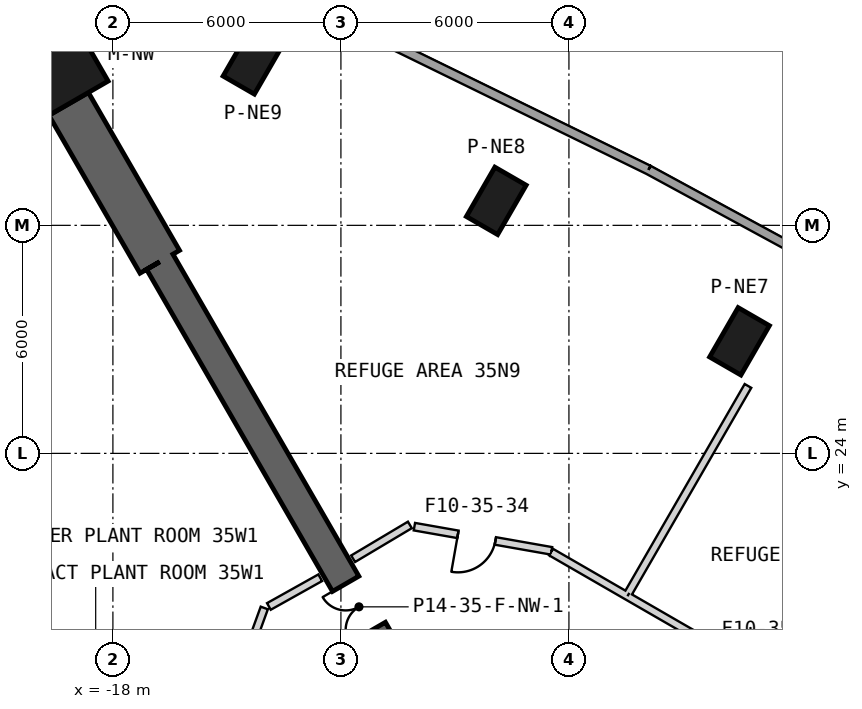
"""IFC4 building model, lengths in metres.
Left out: names, types, materials, properties, quantities, classifications, styles, units other than length and angle.
Written with IfcOpenShell. Run it as: python <this file> out.ifc"""

import sys

from ifc_helpers import new_model, si_unit, direction, frame, frame_2d, origin, origin_2d, place, context, subcontext, project, spatial, rectangle, extrude, element, fill, save


model = new_model("IFC4")
c1 = context("Model", 3, precision=1e-05, world=origin(), true_north=direction((0.0, 1.0)))
c2 = subcontext(c1, "Body", "Model", "MODEL_VIEW")
j1 = project(units=[si_unit("LENGTHUNIT", "METRE"), si_unit("PLANEANGLEUNIT", "RADIAN")], contexts=[c1])
p1 = place(None, origin())
s1 = spatial("IfcSite", under=j1, at=p1, CompositionType="ELEMENT")
p2 = place(p1, origin())
s2 = spatial("IfcBuilding", under=s1, at=p2, CompositionType="ELEMENT")
p3 = place(p2, frame((0.0, 0.0, 163.2)))
s3 = spatial("IfcBuildingStorey", under=s2, at=p3, CompositionType="ELEMENT", Elevation=163.2)
p4 = place(p3, frame((-19.915, 34.494, 0.0), z_axis=(0.0, 0.0, 1.0), x_axis=(-0.5, 0.866025403784, 0.0)))
e1 = element("IfcColumn", 1, at=p4, inside=s3, PredefinedType="COLUMN", context=c2, shape_type="SweptSolid", body=[
    extrude(rectangle(XDim=3.0, YDim=2.4, at=origin_2d()), origin(), (0.0, 0.0, 1.0), 5.7),
])
for number, where, z_axis, x_axis in (
    (2, (-1.511, 26.948, 0.0), (0.0, 0.0, 1.0), (0.5, 0.866, 0.0)),
    (3, (-7.912, 30.644, 0.0), (0.0, 0.0, 1.0), (0.5, 0.866, 0.0)),
    (4, (-14.313, 34.34, 0.0), (0.0, 0.0, 1.0), (0.5, 0.866, 0.0)),
):
    element("IfcColumn", number, at=place(p3, frame(where, z_axis=z_axis, x_axis=x_axis)), inside=s3, PredefinedType="COLUMN", context=c2, shape_type="SweptSolid", body=[
        extrude(rectangle(XDim=1.5, YDim=0.95, at=origin_2d()), origin(), (0.0, 0.0, 1.0), 5.7),
    ])
p5 = place(p3, frame((-10.575, 18.316, 0.0), z_axis=(0.0, 0.0, 1.0), x_axis=(-0.500002326941, 0.86602406032, 0.0)))
e5 = element("IfcWall", 5, at=p5, inside=s3, PredefinedType="SHEAR", context=c2, shape_type="SweptSolid", body=[
    extrude(rectangle(XDim=12.384, YDim=0.8, at=frame_2d((6.192, 0.0))), origin(), (0.0, 0.0, 1.0), 6.0),
])
p6 = place(p5, frame((1.2, 0.0, 0.0)))
e6 = element("IfcOpeningElement", 6, at=p6, cuts=e5, PredefinedType="OPENING", context=c2, shape_type="SweptSolid", body=[
    extrude(rectangle(XDim=1.4, YDim=2.4, at=frame_2d((0.7, 1.2))), frame((0.0, 0.41, 0.0), z_axis=(0.0, -1.0, 0.0), x_axis=(1.0, 0.0, 0.0)), (0.0, 0.0, 1.0), 0.82),
])
p7 = place(p3, frame((-16.767, 29.041, -0.35), z_axis=(0.0, 0.0, 1.0), x_axis=(-0.499998569178, 0.866026229868, 0.0)))
e7 = element("IfcWall", 7, at=p7, inside=s3, PredefinedType="SHEAR", context=c2, shape_type="SweptSolid", body=[
    extrude(rectangle(XDim=4.796, YDim=1.2, at=frame_2d((2.398, 0.0))), origin(), (0.0, 0.0, 1.0), 6.35),
])
p8 = place(p3, frame((29.693, 13.206, 0.0), z_axis=(0.0, 0.0, 1.0), x_axis=(-0.878694903116, 0.477383773539, 0.0)))
e8 = element("IfcWall", 8, at=p8, inside=s3, PredefinedType="SOLIDWALL", context=c2, shape_type="SweptSolid", body=[
    extrude(rectangle(XDim=38.239, YDim=0.24, at=frame_2d((19.12, 0.0))), origin(), (0.0, 0.0, 1.0), 5.7),
])
p9 = place(p3, frame((-3.907, 31.46, 0.0), z_axis=(0.0, 0.0, 1.0), x_axis=(-0.898378322221, 0.439222483672, 0.0)))
e9 = element("IfcWall", 9, at=p9, inside=s3, PredefinedType="SOLIDWALL", context=c2, shape_type="SweptSolid", body=[
    extrude(rectangle(XDim=12.762, YDim=0.24, at=frame_2d((6.381, 0.0))), origin(), (0.0, 0.0, 1.0), 5.7),
])
p10 = place(p3, frame((-14.016, 19.932, 0.0), z_axis=(0.0, 0.0, 1.0), x_axis=(-0.342040663333, -0.93968515186, 0.0)))
e10 = element("IfcWall", 10, at=p10, inside=s3, PredefinedType="PARTITIONING", context=c2, shape_type="SweptSolid", body=[
    extrude(rectangle(XDim=3.096, YDim=0.2, at=frame_2d((1.548, 0.0))), origin(), (0.0, 0.0, 1.0), 4.78),
])
p11 = place(p10, frame((1.037, 0.0, 0.0)))
e11 = element("IfcOpeningElement", 11, at=p11, cuts=e10, PredefinedType="OPENING", context=c2, shape_type="SweptSolid", body=[
    extrude(rectangle(XDim=1.0, YDim=2.1, at=frame_2d((0.5, 1.05))), frame((0.0, 0.11, 0.0), z_axis=(0.0, -1.0, 0.0), x_axis=(1.0, 0.0, 0.0)), (0.0, 0.0, 1.0), 0.22),
])
p12 = place(p3, frame((-12.544, 20.728, 0.0), z_axis=(0.0, 0.0, 1.0), x_axis=(-0.872739922591, -0.488185443777, 0.0)))
e12 = element("IfcWall", 12, at=p12, inside=s3, PredefinedType="PARTITIONING", context=c2, shape_type="SweptSolid", body=[
    extrude(rectangle(XDim=1.548, YDim=0.2, at=frame_2d((0.774, 0.0))), origin(), (0.0, 0.0, 1.0), 5.7),
])
p13 = place(p3, frame((1.617, 16.733, 0.0), z_axis=(0.0, 0.0, 1.0), x_axis=(-0.866020444499, 0.500008589636, 0.0)))
e13 = element("IfcWall", 13, at=p13, inside=s3, PredefinedType="PARTITIONING", context=c2, shape_type="SweptSolid", body=[
    extrude(rectangle(XDim=7.017, YDim=0.2, at=frame_2d((3.508, 0.0))), origin(), (0.0, 0.0, 1.0), 4.98),
])
p14 = place(p13, frame((3.05, 0.0, 0.0)))
e14 = element("IfcOpeningElement", 14, at=p14, cuts=e13, PredefinedType="OPENING", context=c2, shape_type="SweptSolid", body=[
    extrude(rectangle(XDim=1.0, YDim=2.1, at=frame_2d((0.5, 1.05))), frame((0.0, 0.11, 0.0), z_axis=(0.0, -1.0, 0.0), x_axis=(1.0, 0.0, 0.0)), (0.0, 0.0, 1.0), 0.22),
])
p15 = place(p3, frame((-4.46, 20.242, 0.0), z_axis=(0.0, 0.0, 1.0), x_axis=(-0.866008748622, 0.500028846479, 0.0)))
e15 = element("IfcWall", 15, at=p15, inside=s3, PredefinedType="PARTITIONING", context=c2, shape_type="SweptSolid", body=[
    extrude(rectangle(XDim=2.322, YDim=0.2, at=frame_2d((1.161, 0.0))), origin(), (0.0, 0.0, 1.0), 4.88),
])
p16 = place(p3, frame((-10.185, 22.117, 0.0), z_axis=(0.0, 0.0, 1.0), x_axis=(-0.859137024003, -0.511745614526, 0.0)))
e16 = element("IfcWall", 16, at=p16, inside=s3, PredefinedType="PARTITIONING", context=c2, shape_type="SweptSolid", body=[
    extrude(rectangle(XDim=1.738, YDim=0.2, at=frame_2d((0.869, 0.0))), origin(), (0.0, 0.0, 1.0), 5.7),
])
p17 = place(p3, frame((-6.459, 21.436, 0.0), z_axis=(0.0, 0.0, 1.0), x_axis=(-0.984812396858, 0.173621839051, 0.0)))
e17 = element("IfcWall", 17, at=p17, inside=s3, PredefinedType="PARTITIONING", context=c2, shape_type="SweptSolid", body=[
    extrude(rectangle(XDim=3.663, YDim=0.2, at=frame_2d((1.832, 0.0))), origin(), (0.0, 0.0, 1.0), 4.78),
])
p18 = place(p17, frame((1.5, 0.0, 0.0)))
e18 = element("IfcOpeningElement", 18, at=p18, cuts=e17, PredefinedType="OPENING", context=c2, shape_type="SweptSolid", body=[
    extrude(rectangle(XDim=1.0, YDim=2.1, at=frame_2d((0.5, 1.05))), frame((0.0, 0.11, 0.0), z_axis=(0.0, -1.0, 0.0), x_axis=(1.0, 0.0, 0.0)), (0.0, 0.0, 1.0), 0.22),
])
p19 = place(p3, frame((-4.427, 20.338, 0.0), z_axis=(0.0, 0.0, 1.0), x_axis=(0.500016456633, 0.866015902334, 0.0)))
e19 = element("IfcWall", 19, at=p19, inside=s3, PredefinedType="PARTITIONING", context=c2, shape_type="SweptSolid", body=[
    extrude(rectangle(XDim=6.278, YDim=0.2, at=frame_2d((3.139, 0.0))), origin(), (0.0, 0.0, 1.0), 4.98),
])
p20 = place(p18, origin())
e20 = element("IfcDoor", 20, at=p20, inside=s3, OperationType="SINGLE_SWING_RIGHT", PredefinedType="USERDEFINED", context=c2, shape_type="SweptSolid", body=[
    extrude(rectangle(XDim=1.0, YDim=2.1, at=frame_2d((0.5, 1.05))), frame((0.0, 0.025, 0.0), z_axis=(0.0, -1.0, 0.0), x_axis=(1.0, 0.0, 0.0)), (0.0, 0.0, 1.0), 0.05),
])
fill(e18, e20)
p21 = place(p6, origin())
e21 = element("IfcDoor", 21, at=p21, inside=s3, OperationType="DOUBLE_DOOR_SINGLE_SWING", PredefinedType="NOTDEFINED", context=c2, shape_type="SweptSolid", body=[
    extrude(rectangle(XDim=1.4, YDim=2.4, at=frame_2d((0.7, 1.2))), frame((0.0, 0.025, 0.0), z_axis=(0.0, -1.0, 0.0), x_axis=(1.0, 0.0, 0.0)), (0.0, 0.0, 1.0), 0.05),
])
fill(e6, e21)
save(model, sys.argv[1])
